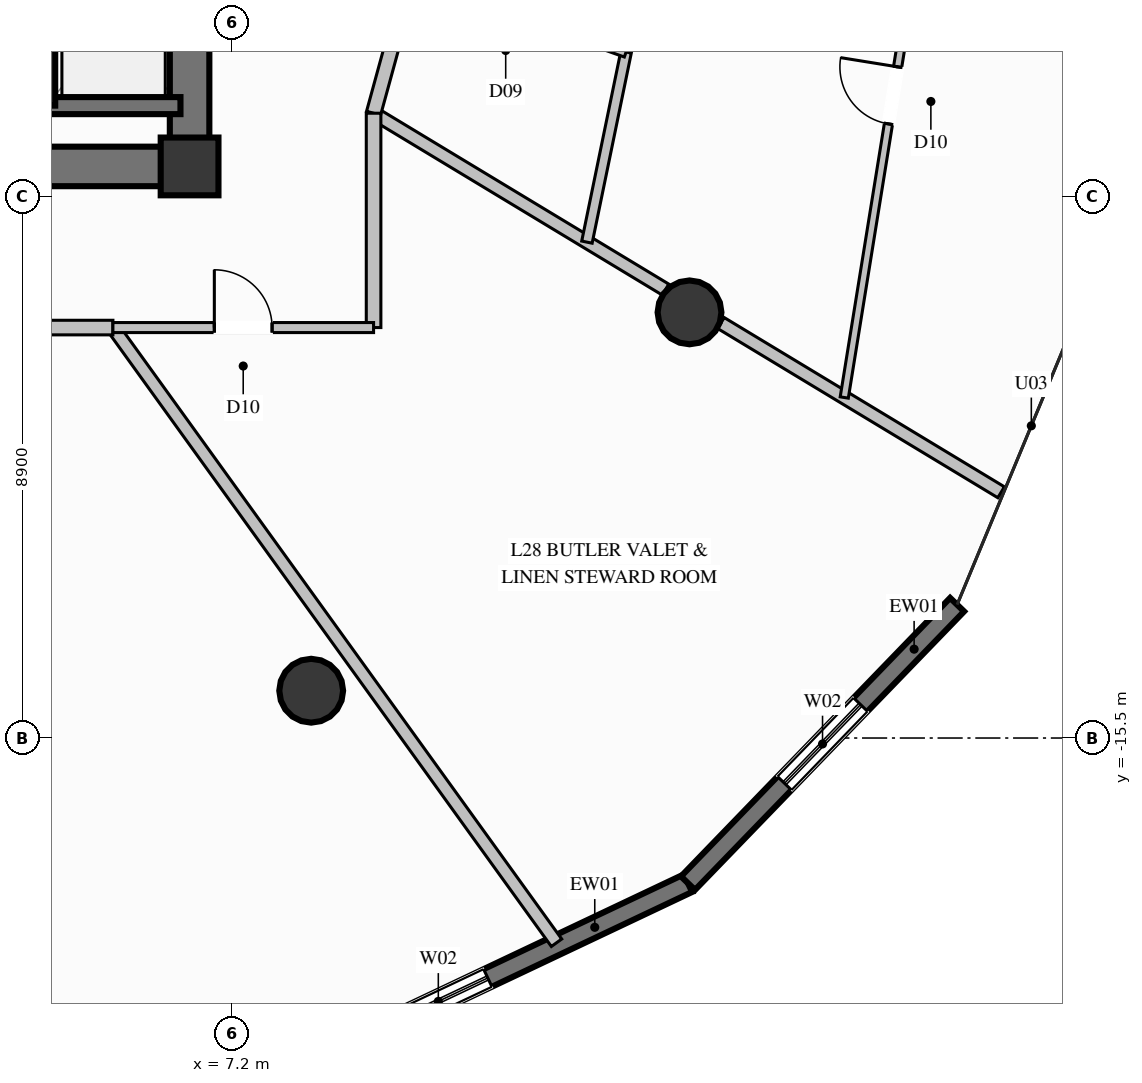
"""IFC4 building model, lengths in metres.
Left out: names, types, materials, properties, quantities, classifications, styles, units other than length and angle.
Written with IfcOpenShell. Run it as: python <this file> out.ifc"""

import sys

from ifc_helpers import new_model, si_unit, direction, frame, frame_2d, origin, origin_2d, place, context, subcontext, project, spatial, rectangle, circle, extrude, element, fill, save


model = new_model("IFC4")
c1 = context("Model", 3, precision=1e-05, world=origin(), true_north=direction((0.0, 1.0)))
c2 = subcontext(c1, "Body", "Model", "MODEL_VIEW")
j1 = project(units=[si_unit("LENGTHUNIT", "METRE"), si_unit("PLANEANGLEUNIT", "RADIAN")], contexts=[c1])
p1 = place(None, origin())
s1 = spatial("IfcSite", under=j1, at=p1, CompositionType="ELEMENT")
p2 = place(p1, origin())
s2 = spatial("IfcBuilding", under=s1, at=p2, CompositionType="ELEMENT")
p3 = place(p2, frame((0.0, 0.0, 113.4)))
s3 = spatial("IfcBuildingStorey", under=s2, at=p3, CompositionType="ELEMENT", Elevation=113.4)
p4 = place(p3, frame((6.5, -6.1, 0.0), z_axis=(0.0, 0.0, 1.0), x_axis=(1.0, 0.0, 0.0)))
e1 = element("IfcColumn", 1, at=p4, inside=s3, PredefinedType="COLUMN", context=c2, shape_type="SweptSolid", body=[
    extrude(rectangle(XDim=0.95, YDim=0.95, at=origin_2d()), origin(), (0.0, 0.0, 1.0), 3.6),
])
p5 = place(p3, frame((4.15, -6.1, 0.0), z_axis=(0.0, 0.0, 1.0), x_axis=(1.0, 0.0, 0.0)))
e2 = element("IfcWall", 2, at=p5, inside=s3, PredefinedType="SHEAR", context=c2, shape_type="SweptSolid", body=[
    extrude(rectangle(XDim=2.025, YDim=0.65, at=frame_2d((1.013, 0.0))), origin(), (0.0, 0.0, 1.0), 3.6),
])
p6 = place(p3, frame((6.5, -6.425, 0.0), z_axis=(0.0, 0.0, 1.0), x_axis=(0.0, 1.0, 0.0)))
e3 = element("IfcWall", 3, at=p6, inside=s3, PredefinedType="SHEAR", context=c2, shape_type="SweptSolid", body=[
    extrude(rectangle(XDim=4.075, YDim=0.65, at=frame_2d((2.038, 0.0))), origin(), (0.0, 0.0, 1.0), 3.6),
])
for number, where, z_axis, x_axis in (
    (4, (8.5, -14.722, 0.0), (0.0, 0.0, 1.0), (1.0, 0.0, 0.0)),
    (5, (14.722, -8.5, 0.0), (0.0, 0.0, 1.0), (1.0, 0.0, 0.0)),
):
    element("IfcColumn", number, at=place(p3, frame(where, z_axis=z_axis, x_axis=x_axis)), inside=s3, PredefinedType="COLUMN", context=c2, shape_type="SweptSolid", body=[
        extrude(circle(Radius=0.525, at=origin_2d()), origin(), (0.0, 0.0, 1.0), 3.6),
    ])
p7 = place(p3, frame((14.697, -17.887, 0.0), z_axis=(0.0, 0.0, 1.0), x_axis=(-0.903862591662, -0.42782287853, 0.0)))
e6 = element("IfcWall", 6, at=p7, inside=s3, PredefinedType="SOLIDWALL", context=c2, shape_type="SweptSolid", body=[
    extrude(rectangle(XDim=6.613, YDim=0.32, at=frame_2d((3.306, 0.0))), origin(), (0.0, 0.0, 1.0), 3.35),
])
p8 = place(p7, frame((3.643, 0.0, 0.35)))
e7 = element("IfcOpeningElement", 7, at=p8, cuts=e6, PredefinedType="OPENING", context=c2, shape_type="SweptSolid", body=[
    extrude(rectangle(XDim=1.8, YDim=2.6, at=frame_2d((0.9, 1.3))), frame((0.0, 0.17, 0.0), z_axis=(0.0, -1.0, 0.0), x_axis=(1.0, 0.0, 0.0)), (0.0, 0.0, 1.0), 0.34),
])
p9 = place(p3, frame((19.123, -13.307, 0.0), z_axis=(0.0, 0.0, 1.0), x_axis=(-0.694909802273, -0.71909691051, 0.0)))
e8 = element("IfcWall", 8, at=p9, inside=s3, PredefinedType="SOLIDWALL", context=c2, shape_type="SweptSolid", body=[
    extrude(rectangle(XDim=6.369, YDim=0.32, at=frame_2d((3.185, 0.0))), origin(), (0.0, 0.0, 1.0), 3.35),
])
p10 = place(p9, frame((2.285, 0.0, 0.35)))
e9 = element("IfcOpeningElement", 9, at=p10, cuts=e8, PredefinedType="OPENING", context=c2, shape_type="SweptSolid", body=[
    extrude(rectangle(XDim=1.8, YDim=2.6, at=frame_2d((0.9, 1.3))), frame((0.0, 0.17, 0.0), z_axis=(0.0, -1.0, 0.0), x_axis=(1.0, 0.0, 0.0)), (0.0, 0.0, 1.0), 0.34),
])
p11 = place(p3, frame((4.15, -5.1, 0.0), z_axis=(0.0, 0.0, 1.0), x_axis=(1.0, 0.0, 0.0)))
e10 = element("IfcWall", 10, at=p11, inside=s3, PredefinedType="SOLIDWALL", context=c2, shape_type="SweptSolid", body=[
    extrude(rectangle(XDim=2.2, YDim=0.28, at=frame_2d((1.1, 0.0))), origin(), (0.0, 0.0, 1.0), 3.35),
])
p12 = place(p3, frame((4.15, -2.4, 0.0), z_axis=(0.0, 0.0, 1.0), x_axis=(0.0, -1.0, 0.0)))
e11 = element("IfcWall", 11, at=p12, inside=s3, PredefinedType="SOLIDWALL", context=c2, shape_type="SweptSolid", body=[
    extrude(rectangle(XDim=2.7, YDim=0.28, at=frame_2d((1.35, 0.0))), origin(), (0.0, 0.0, 1.0), 3.35),
])
p13 = place(p3, frame((9.526, -5.225, 0.0), z_axis=(0.0, 0.0, 1.0), x_axis=(0.855972129744, -0.517021965782, 0.0)))
e12 = element("IfcWall", 12, at=p13, inside=s3, PredefinedType="PARTITIONING", context=c2, shape_type="SweptSolid", body=[
    extrude(rectangle(XDim=5.609, YDim=0.21, at=frame_2d((2.804, 0.0))), origin(), (0.0, 0.0, 1.0), 2.718),
])
p14 = place(p3, frame((15.238, -8.675, 0.0), z_axis=(0.0, 0.0, 1.0), x_axis=(0.855964873526, -0.517033978854, 0.0)))
e13 = element("IfcWall", 13, at=p14, inside=s3, PredefinedType="PARTITIONING", context=c2, shape_type="SweptSolid", body=[
    extrude(rectangle(XDim=5.385, YDim=0.21, at=frame_2d((2.692, 0.0))), origin(), (0.0, 0.0, 1.0), 3.35),
])
p15 = place(p3, frame((9.526, -5.225, 0.0), z_axis=(0.0, 0.0, 1.0), x_axis=(0.264431780812, 0.964404393031, 0.0)))
e14 = element("IfcWall", 14, at=p15, inside=s3, PredefinedType="PARTITIONING", context=c2, shape_type="SweptSolid", body=[
    extrude(rectangle(XDim=2.341, YDim=0.24, at=frame_2d((1.171, 0.0))), origin(), (0.0, 0.0, 1.0), 3.35),
])
p16 = place(p3, frame((13.035, -7.345, 0.0), z_axis=(0.0, 0.0, 1.0), x_axis=(0.201730596841, 0.979441047893, 0.0)))
e15 = element("IfcWall", 15, at=p16, inside=s3, PredefinedType="PLUMBINGWALL", context=c2, shape_type="SweptSolid", body=[
    extrude(rectangle(XDim=3.193, YDim=0.175, at=frame_2d((1.596, 0.0))), origin(), (0.0, 0.0, 1.0), 3.35),
])
p17 = place(p3, frame((10.145, -2.967, 0.0), z_axis=(0.0, 0.0, 1.0), x_axis=(0.94267973016, -0.333698855775, 0.0)))
e16 = element("IfcWall", 16, at=p17, inside=s3, PredefinedType="PLUMBINGWALL", context=c2, shape_type="SweptSolid", body=[
    extrude(rectangle(XDim=3.749, YDim=0.175, at=frame_2d((1.875, 0.0))), origin(), (0.0, 0.0, 1.0), 3.35),
])
p18 = place(p17, frame((1.424, 0.0, 0.0)))
e17 = element("IfcOpeningElement", 17, at=p18, cuts=e16, PredefinedType="OPENING", context=c2, shape_type="SweptSolid", body=[
    extrude(rectangle(XDim=0.9, YDim=2.1, at=frame_2d((0.45, 1.05))), frame((0.0, 0.098, 0.0), z_axis=(0.0, -1.0, 0.0), x_axis=(1.0, 0.0, 0.0)), (0.0, 0.0, 1.0), 0.195),
])
p19 = place(p3, frame((17.267, -9.9, 0.0), z_axis=(0.0, 0.0, 1.0), x_axis=(0.159433733404, 0.987208632789, 0.0)))
e18 = element("IfcWall", 18, at=p19, inside=s3, PredefinedType="PARTITIONING", context=c2, shape_type="SweptSolid", body=[
    extrude(rectangle(XDim=10.067, YDim=0.135, at=frame_2d((5.033, 0.0))), origin(), (0.0, 0.0, 1.0), 3.35),
])
p20 = place(p19, frame((4.558, 0.0, 0.0)))
e19 = element("IfcOpeningElement", 19, at=p20, cuts=e18, PredefinedType="OPENING", context=c2, shape_type="SweptSolid", body=[
    extrude(rectangle(XDim=0.95, YDim=2.1, at=frame_2d((0.475, 1.05))), frame((0.0, 0.078, 0.0), z_axis=(0.0, -1.0, 0.0), x_axis=(1.0, 0.0, 0.0)), (0.0, 0.0, 1.0), 0.155),
])
p21 = place(p3, frame((5.239, -8.75, 0.0), z_axis=(0.0, 0.0, 1.0), x_axis=(0.584922274278, -0.811089349612, 0.0)))
e20 = element("IfcWall", 20, at=p21, inside=s3, PredefinedType="PARTITIONING", context=c2, shape_type="SweptSolid", body=[
    extrude(rectangle(XDim=12.473, YDim=0.21, at=frame_2d((6.237, 0.0))), origin(), (0.0, 0.0, 1.0), 3.35),
])
p22 = place(p3, frame((0.0, -8.75, 0.0), z_axis=(0.0, 0.0, 1.0), x_axis=(1.0, 0.0, 0.0)))
e21 = element("IfcWall", 21, at=p22, inside=s3, PredefinedType="PARTITIONING", context=c2, shape_type="SweptSolid", body=[
    extrude(rectangle(XDim=5.239, YDim=0.24, at=frame_2d((2.62, 0.0))), origin(), (0.0, 0.0, 1.0), 3.35),
])
p23 = place(p3, frame((9.526, -8.75, 0.0), z_axis=(0.0, 0.0, 1.0), x_axis=(0.0, 1.0, 0.0)))
e22 = element("IfcWall", 22, at=p23, inside=s3, PredefinedType="PARTITIONING", context=c2, shape_type="SweptSolid", body=[
    extrude(rectangle(XDim=3.525, YDim=0.24, at=frame_2d((1.762, 0.0))), origin(), (0.0, 0.0, 1.0), 3.35),
])
p24 = place(p3, frame((5.239, -8.75, 0.0), z_axis=(0.0, 0.0, 1.0), x_axis=(1.0, 0.0, 0.0)))
e23 = element("IfcWall", 23, at=p24, inside=s3, PredefinedType="PARTITIONING", context=c2, shape_type="SweptSolid", body=[
    extrude(rectangle(XDim=4.287, YDim=0.165, at=frame_2d((2.144, 0.0))), origin(), (0.0, 0.0, 1.0), 3.35),
])
p25 = place(p24, frame((1.668, 0.0, 0.0)))
e24 = element("IfcOpeningElement", 24, at=p25, cuts=e23, PredefinedType="OPENING", context=c2, shape_type="SweptSolid", body=[
    extrude(rectangle(XDim=0.95, YDim=2.1, at=frame_2d((0.475, 1.05))), frame((0.0, 0.093, 0.0), z_axis=(0.0, -1.0, 0.0), x_axis=(1.0, 0.0, 0.0)), (0.0, 0.0, 1.0), 0.185),
])
p26 = place(p8, origin())
e25 = element("IfcWindow", 25, at=p26, inside=s3, PartitioningType="SINGLE_PANEL", PredefinedType="WINDOW", context=c2, shape_type="SweptSolid", body=[
    extrude(rectangle(XDim=1.8, YDim=2.6, at=frame_2d((0.9, 1.3))), frame((0.0, 0.03, 0.0), z_axis=(0.0, -1.0, 0.0), x_axis=(1.0, 0.0, 0.0)), (0.0, 0.0, 1.0), 0.06),
])
fill(e7, e25)
p27 = place(p10, origin())
e26 = element("IfcWindow", 26, at=p27, inside=s3, PartitioningType="SINGLE_PANEL", PredefinedType="WINDOW", context=c2, shape_type="SweptSolid", body=[
    extrude(rectangle(XDim=1.8, YDim=2.6, at=frame_2d((0.9, 1.3))), frame((0.0, 0.03, 0.0), z_axis=(0.0, -1.0, 0.0), x_axis=(1.0, 0.0, 0.0)), (0.0, 0.0, 1.0), 0.06),
])
fill(e9, e26)
p28 = place(p20, origin())
e27 = element("IfcDoor", 27, at=p28, inside=s3, OperationType="SINGLE_SWING_RIGHT", PredefinedType="DOOR", context=c2, shape_type="SweptSolid", body=[
    extrude(rectangle(XDim=0.95, YDim=2.1, at=frame_2d((0.475, 1.05))), frame((0.0, 0.025, 0.0), z_axis=(0.0, -1.0, 0.0), x_axis=(1.0, 0.0, 0.0)), (0.0, 0.0, 1.0), 0.05),
])
fill(e19, e27)
p29 = place(p25, origin())
e28 = element("IfcDoor", 28, at=p29, inside=s3, OperationType="SINGLE_SWING_LEFT", PredefinedType="DOOR", context=c2, shape_type="SweptSolid", body=[
    extrude(rectangle(XDim=0.95, YDim=2.1, at=frame_2d((0.475, 1.05))), frame((0.0, 0.025, 0.0), z_axis=(0.0, -1.0, 0.0), x_axis=(1.0, 0.0, 0.0)), (0.0, 0.0, 1.0), 0.05),
])
fill(e24, e28)
save(model, sys.argv[1])
